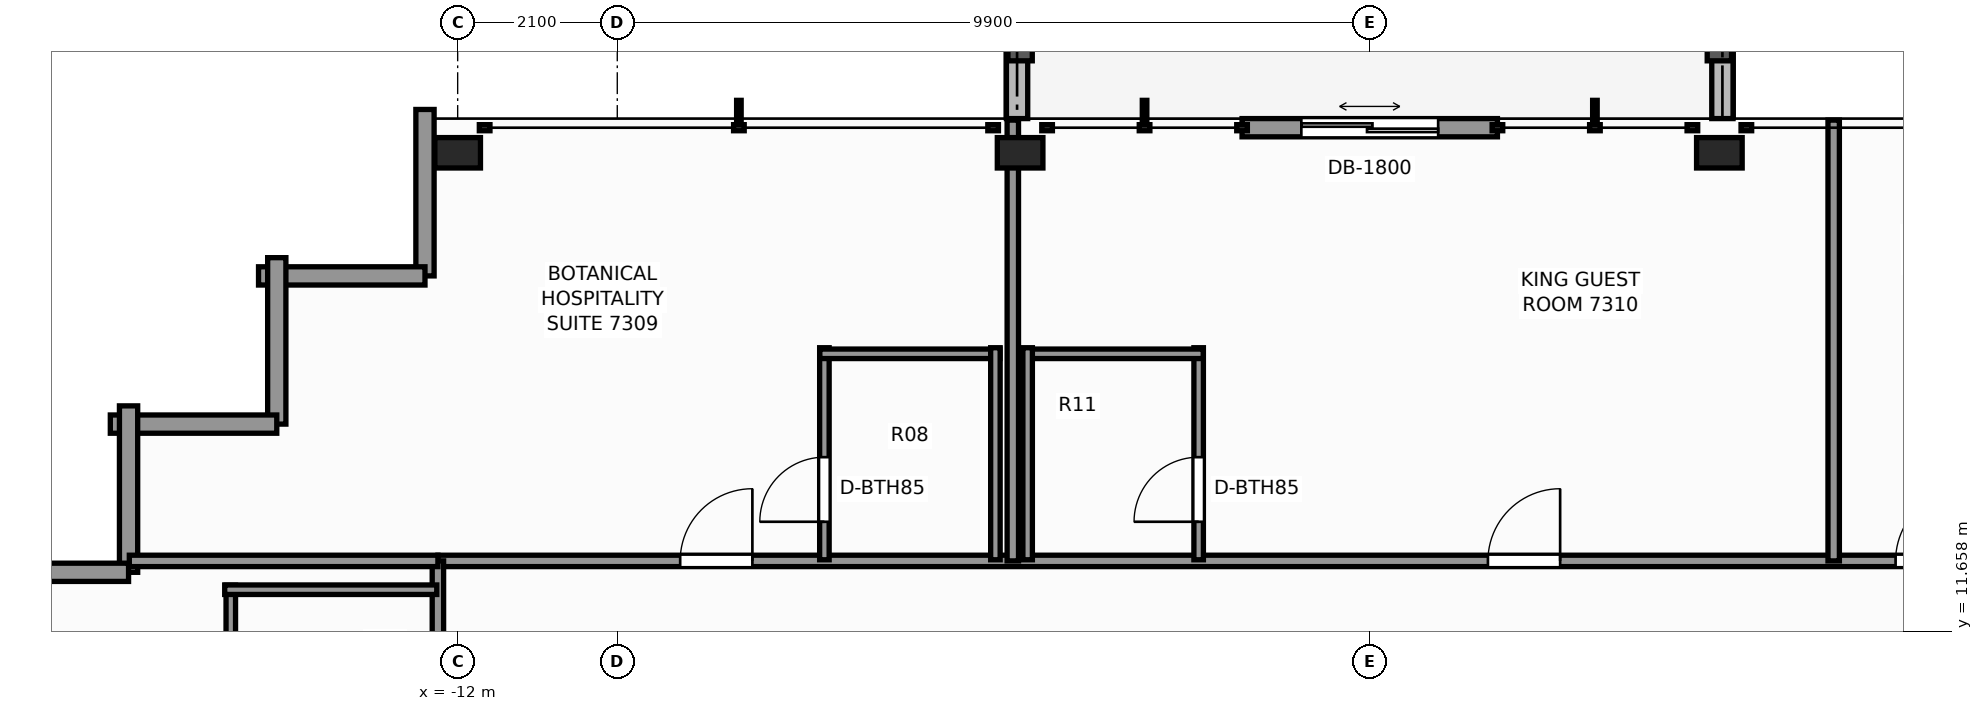
"""IFC4 building model, lengths in metres.
Left out: names, types, materials, properties, quantities, classifications, styles, units other than length and angle.
Written with IfcOpenShell. Run it as: python <this file> out.ifc"""

import sys

from ifc_helpers import new_model, si_unit, direction, frame, frame_2d, origin, origin_2d, place, context, subcontext, project, spatial, rectangle, extrude, element, fill, save


model = new_model("IFC4")
c1 = context("Model", 3, precision=1e-05, world=origin(), true_north=direction((0.0, 1.0)))
c2 = subcontext(c1, "Body", "Model", "MODEL_VIEW")
j1 = project(units=[si_unit("LENGTHUNIT", "METRE"), si_unit("PLANEANGLEUNIT", "RADIAN")], contexts=[c1])
p1 = place(None, origin())
s1 = spatial("IfcSite", under=j1, at=p1, CompositionType="ELEMENT")
p2 = place(p1, origin())
s2 = spatial("IfcBuilding", under=s1, at=p2, CompositionType="ELEMENT")
p3 = place(p2, frame((0.0, 0.0, 251.4)))
s3 = spatial("IfcBuildingStorey", under=s2, at=p3, CompositionType="ELEMENT", Elevation=251.4)
for number, where, z_axis, x_axis in (
    (1, (-12.0, 17.95, 0.0), (0.0, 0.0, 1.0), (1.0, 0.0, 0.0)),
    (2, (-4.6, 17.95, 0.0), (0.0, 0.0, 1.0), (1.0, 0.0, 0.0)),
    (3, (4.6, 17.95, 0.0), (0.0, 0.0, 1.0), (1.0, 0.0, 0.0)),
):
    element("IfcColumn", number, at=place(p3, frame(where, z_axis=z_axis, x_axis=x_axis)), inside=s3, PredefinedType="COLUMN", context=c2, shape_type="SweptSolid", body=[
        extrude(rectangle(XDim=0.6, YDim=0.4, at=origin_2d()), origin(), (0.0, 0.0, 1.0), 3.5),
    ])
for number, where, z_axis, x_axis in (
    (4, (4.64, 18.4, -0.07), (0.0, 0.0, 1.0), (0.0, 1.0, 0.0)),
    (5, (-4.64, 21.7, -0.07), (0.0, 0.0, 1.0), (0.0, -1.0, 0.0)),
):
    element("IfcWall", number, at=place(p3, frame(where, z_axis=z_axis, x_axis=x_axis)), inside=s3, PredefinedType="PARAPET", context=c2, shape_type="SweptSolid", body=[
        extrude(rectangle(XDim=3.3, YDim=0.28, at=frame_2d((1.65, 0.0))), origin(), (0.0, 0.0, 1.0), 0.42),
    ])
p4 = place(p3, frame((-1.68, 18.28, 0.0), z_axis=(0.0, 0.0, 1.0), x_axis=(1.0, 0.0, 0.0)))
e6 = element("IfcWall", 6, at=p4, inside=s3, PredefinedType="STANDARD", context=c2, shape_type="SweptSolid", body=[
    extrude(rectangle(XDim=3.36, YDim=0.24, at=frame_2d((1.68, 0.0))), origin(), (0.0, 0.0, 1.0), 3.25),
])
p5 = place(p4, frame((0.78, 0.0, 0.0)))
e7 = element("IfcOpeningElement", 7, at=p5, cuts=e6, PredefinedType="OPENING", context=c2, shape_type="SweptSolid", body=[
    extrude(rectangle(XDim=1.8, YDim=2.2, at=frame_2d((0.9, 1.1))), frame((0.0, 0.13, 0.0), z_axis=(0.0, -1.0, 0.0), x_axis=(1.0, 0.0, 0.0)), (0.0, 0.0, 1.0), 0.26),
])
p6 = place(p3, frame((-12.43, 16.33, 0.0), z_axis=(0.0, 0.0, 1.0), x_axis=(0.0, 1.0, 0.0)))
e8 = element("IfcWall", 8, at=p6, inside=s3, PredefinedType="STANDARD", context=c2, shape_type="SweptSolid", body=[
    extrude(rectangle(XDim=2.19, YDim=0.24, at=frame_2d((1.095, 0.0))), origin(), (0.0, 0.0, 1.0), 2.633),
])
for number, where, z_axis, x_axis in (
    (9, (-14.62, 16.33, 0.0), (0.0, 0.0, 1.0), (1.0, 0.0, 0.0)),
    (10, (-14.38, 14.38, 0.0), (0.0, 0.0, 1.0), (0.0, 1.0, 0.0)),
    (11, (-16.57, 14.38, 0.0), (0.0, 0.0, 1.0), (1.0, 0.0, 0.0)),
    (12, (-16.33, 12.43, 0.0), (0.0, 0.0, 1.0), (0.0, 1.0, 0.0)),
):
    element("IfcWall", number, at=place(p3, frame(where, z_axis=z_axis, x_axis=x_axis)), inside=s3, PredefinedType="STANDARD", context=c2, shape_type="SweptSolid", body=[
        extrude(rectangle(XDim=2.19, YDim=0.24, at=frame_2d((1.095, 0.0))), origin(), (0.0, 0.0, 1.0), 2.633),
    ])
p7 = place(p3, frame((-18.52, 12.43, 0.0), z_axis=(0.0, 0.0, 1.0), x_axis=(1.0, 0.0, 0.0)))
e13 = element("IfcWall", 13, at=p7, inside=s3, PredefinedType="STANDARD", context=c2, shape_type="SweptSolid", body=[
    extrude(rectangle(XDim=2.19, YDim=0.24, at=frame_2d((1.095, 0.0))), origin(), (0.0, 0.0, 1.0), 2.633),
])
p8 = place(p3, frame((-12.26, 12.58, 0.0), z_axis=(0.0, 0.0, 1.0), x_axis=(1.0, 0.0, 0.0)))
e14 = element("IfcWall", 14, at=p8, inside=s3, PredefinedType="PARTITIONING", context=c2, shape_type="SweptSolid", body=[
    extrude(rectangle(XDim=24.68, YDim=0.15, at=frame_2d((12.34, 0.0))), origin(), (0.0, 0.0, 1.0), 2.539),
])
p9 = place(p8, frame((3.188, 0.0, 0.0)))
e15 = element("IfcOpeningElement", 15, at=p9, cuts=e14, PredefinedType="OPENING", context=c2, shape_type="SweptSolid", body=[
    extrude(rectangle(XDim=0.95, YDim=2.06, at=frame_2d((0.475, 1.03))), frame((0.0, 0.085, 0.0), z_axis=(0.0, -1.0, 0.0), x_axis=(1.0, 0.0, 0.0)), (0.0, 0.0, 1.0), 0.17),
])
p10 = place(p8, frame((13.815, 0.0, 0.0)))
e16 = element("IfcOpeningElement", 16, at=p10, cuts=e14, PredefinedType="OPENING", context=c2, shape_type="SweptSolid", body=[
    extrude(rectangle(XDim=0.95, YDim=2.06, at=frame_2d((0.475, 1.03))), frame((0.0, 0.085, 0.0), z_axis=(0.0, -1.0, 0.0), x_axis=(1.0, 0.0, 0.0)), (0.0, 0.0, 1.0), 0.17),
])
p11 = place(p8, frame((19.178, 0.0, 0.0)))
e17 = element("IfcOpeningElement", 17, at=p11, cuts=e14, PredefinedType="OPENING", context=c2, shape_type="SweptSolid", body=[
    extrude(rectangle(XDim=0.95, YDim=2.06, at=frame_2d((0.475, 1.03))), frame((0.0, 0.085, 0.0), z_axis=(0.0, -1.0, 0.0), x_axis=(1.0, 0.0, 0.0)), (0.0, 0.0, 1.0), 0.17),
])
p12 = place(p3, frame((-12.26, -12.26, 0.0), z_axis=(0.0, 0.0, 1.0), x_axis=(0.0, 1.0, 0.0)))
e18 = element("IfcWall", 18, at=p12, inside=s3, PredefinedType="PARTITIONING", context=c2, shape_type="SweptSolid", body=[
    extrude(rectangle(XDim=24.84, YDim=0.15, at=frame_2d((12.42, 0.0))), origin(), (0.0, 0.0, 1.0), 2.539),
])
p13 = place(p12, frame((3.631, 0.0, 0.0)))
e19 = element("IfcOpeningElement", 19, at=p13, cuts=e18, PredefinedType="OPENING", context=c2, shape_type="SweptSolid", body=[
    extrude(rectangle(XDim=0.95, YDim=2.06, at=frame_2d((0.475, 1.03))), frame((0.0, 0.085, 0.0), z_axis=(0.0, -1.0, 0.0), x_axis=(1.0, 0.0, 0.0)), (0.0, 0.0, 1.0), 0.17),
])
p14 = place(p12, frame((8.701, 0.0, 0.0)))
e20 = element("IfcOpeningElement", 20, at=p14, cuts=e18, PredefinedType="OPENING", context=c2, shape_type="SweptSolid", body=[
    extrude(rectangle(XDim=0.95, YDim=2.06, at=frame_2d((0.475, 1.03))), frame((0.0, 0.085, 0.0), z_axis=(0.0, -1.0, 0.0), x_axis=(1.0, 0.0, 0.0)), (0.0, 0.0, 1.0), 0.17),
])
p15 = place(p12, frame((14.031, 0.0, 0.0)))
e21 = element("IfcOpeningElement", 21, at=p15, cuts=e18, PredefinedType="OPENING", context=c2, shape_type="SweptSolid", body=[
    extrude(rectangle(XDim=0.95, YDim=2.06, at=frame_2d((0.475, 1.03))), frame((0.0, 0.085, 0.0), z_axis=(0.0, -1.0, 0.0), x_axis=(1.0, 0.0, 0.0)), (0.0, 0.0, 1.0), 0.17),
])
p16 = place(p12, frame((19.741, 0.0, 0.0)))
e22 = element("IfcOpeningElement", 22, at=p16, cuts=e18, PredefinedType="OPENING", context=c2, shape_type="SweptSolid", body=[
    extrude(rectangle(XDim=0.95, YDim=2.06, at=frame_2d((0.475, 1.03))), frame((0.0, 0.085, 0.0), z_axis=(0.0, -1.0, 0.0), x_axis=(1.0, 0.0, 0.0)), (0.0, 0.0, 1.0), 0.17),
])
p17 = place(p3, frame((-16.32, 12.58, 0.0), z_axis=(0.0, 0.0, 1.0), x_axis=(1.0, 0.0, 0.0)))
e23 = element("IfcWall", 23, at=p17, inside=s3, PredefinedType="PARTITIONING", context=c2, shape_type="SweptSolid", body=[
    extrude(rectangle(XDim=4.06, YDim=0.15, at=frame_2d((2.03, 0.0))), origin(), (0.0, 0.0, 1.0), 3.25),
])
p18 = place(p3, frame((-14.985, 9.891, 0.0), z_axis=(0.0, 0.0, 1.0), x_axis=(0.0, 1.0, 0.0)))
e24 = element("IfcWall", 24, at=p18, inside=s3, PredefinedType="PARTITIONING", context=c2, shape_type="SweptSolid", body=[
    extrude(rectangle(XDim=2.37, YDim=0.125, at=frame_2d((1.185, 0.0))), origin(), (0.0, 0.0, 1.0), 2.539),
])
p19 = place(p3, frame((-15.065, 12.201, 0.0), z_axis=(0.0, 0.0, 1.0), x_axis=(1.0, 0.0, 0.0)))
e25 = element("IfcWall", 25, at=p19, inside=s3, PredefinedType="PARTITIONING", context=c2, shape_type="SweptSolid", body=[
    extrude(rectangle(XDim=2.79, YDim=0.125, at=frame_2d((1.395, 0.0))), origin(), (0.0, 0.0, 1.0), 3.25),
])
p20 = place(p3, frame((-4.696, 12.58, 0.0), z_axis=(0.0, 0.0, 1.0), x_axis=(0.0, 1.0, 0.0)))
e26 = element("IfcWall", 26, at=p20, inside=s3, PredefinedType="PARTITIONING", context=c2, shape_type="SweptSolid", body=[
    extrude(rectangle(XDim=5.8, YDim=0.15, at=frame_2d((2.9, 0.0))), origin(), (0.0, 0.0, 1.0), 2.539),
])
p21 = place(p3, frame((-7.175, 12.595, 0.0), z_axis=(0.0, 0.0, 1.0), x_axis=(0.0, 1.0, 0.0)))
e27 = element("IfcWall", 27, at=p21, inside=s3, PredefinedType="PARTITIONING", context=c2, shape_type="SweptSolid", body=[
    extrude(rectangle(XDim=2.79, YDim=0.125, at=frame_2d((1.395, 0.0))), origin(), (0.0, 0.0, 1.0), 3.25),
])
p22 = place(p21, frame((0.5, 0.0, 0.0)))
e28 = element("IfcOpeningElement", 28, at=p22, cuts=e27, PredefinedType="OPENING", context=c2, shape_type="SweptSolid", body=[
    extrude(rectangle(XDim=0.85, YDim=2.03, at=frame_2d((0.425, 1.015))), frame((0.0, 0.073, 0.0), z_axis=(0.0, -1.0, 0.0), x_axis=(1.0, 0.0, 0.0)), (0.0, 0.0, 1.0), 0.145),
])
p23 = place(p3, frame((-7.235, 15.305, 0.0), z_axis=(0.0, 0.0, 1.0), x_axis=(1.0, 0.0, 0.0)))
e29 = element("IfcWall", 29, at=p23, inside=s3, PredefinedType="PARTITIONING", context=c2, shape_type="SweptSolid", body=[
    extrude(rectangle(XDim=2.37, YDim=0.125, at=frame_2d((1.185, 0.0))), origin(), (0.0, 0.0, 1.0), 3.25),
])
p24 = place(p3, frame((-4.925, 12.595, 0.0), z_axis=(0.0, 0.0, 1.0), x_axis=(0.0, 1.0, 0.0)))
e30 = element("IfcWall", 30, at=p24, inside=s3, PredefinedType="PARTITIONING", context=c2, shape_type="SweptSolid", body=[
    extrude(rectangle(XDim=2.79, YDim=0.125, at=frame_2d((1.395, 0.0))), origin(), (0.0, 0.0, 1.0), 3.25),
])
p25 = place(p3, frame((6.104, 12.58, 0.0), z_axis=(0.0, 0.0, 1.0), x_axis=(0.0, 1.0, 0.0)))
e31 = element("IfcWall", 31, at=p25, inside=s3, PredefinedType="PARTITIONING", context=c2, shape_type="SweptSolid", body=[
    extrude(rectangle(XDim=5.8, YDim=0.15, at=frame_2d((2.9, 0.0))), origin(), (0.0, 0.0, 1.0), 2.623),
])
p26 = place(p3, frame((-2.251, 12.595, 0.0), z_axis=(0.0, 0.0, 1.0), x_axis=(0.0, 1.0, 0.0)))
e32 = element("IfcWall", 32, at=p26, inside=s3, PredefinedType="PARTITIONING", context=c2, shape_type="SweptSolid", body=[
    extrude(rectangle(XDim=2.79, YDim=0.125, at=frame_2d((1.395, 0.0))), origin(), (0.0, 0.0, 1.0), 3.25),
])
p27 = place(p26, frame((0.5, 0.0, 0.0)))
e33 = element("IfcOpeningElement", 33, at=p27, cuts=e32, PredefinedType="OPENING", context=c2, shape_type="SweptSolid", body=[
    extrude(rectangle(XDim=0.85, YDim=2.03, at=frame_2d((0.425, 1.015))), frame((0.0, 0.073, 0.0), z_axis=(0.0, -1.0, 0.0), x_axis=(1.0, 0.0, 0.0)), (0.0, 0.0, 1.0), 0.145),
])
p28 = place(p3, frame((-4.561, 15.305, 0.0), z_axis=(0.0, 0.0, 1.0), x_axis=(1.0, 0.0, 0.0)))
e34 = element("IfcWall", 34, at=p28, inside=s3, PredefinedType="PARTITIONING", context=c2, shape_type="SweptSolid", body=[
    extrude(rectangle(XDim=2.37, YDim=0.125, at=frame_2d((1.185, 0.0))), origin(), (0.0, 0.0, 1.0), 2.539),
])
p29 = place(p3, frame((-4.501, 12.595, 0.0), z_axis=(0.0, 0.0, 1.0), x_axis=(0.0, 1.0, 0.0)))
e35 = element("IfcWall", 35, at=p29, inside=s3, PredefinedType="PARTITIONING", context=c2, shape_type="SweptSolid", body=[
    extrude(rectangle(XDim=2.79, YDim=0.125, at=frame_2d((1.395, 0.0))), origin(), (0.0, 0.0, 1.0), 2.539),
])
p30 = place(p5, origin())
e36 = element("IfcDoor", 36, at=p30, inside=s3, OperationType="DOUBLE_DOOR_SLIDING", PredefinedType="DOOR", context=c2, shape_type="SweptSolid", body=[
    extrude(rectangle(XDim=1.8, YDim=2.2, at=frame_2d((0.9, 1.1))), frame((0.0, 0.025, 0.0), z_axis=(0.0, -1.0, 0.0), x_axis=(1.0, 0.0, 0.0)), (0.0, 0.0, 1.0), 0.05),
])
fill(e7, e36)
p31 = place(p22, origin())
e37 = element("IfcDoor", 37, at=p31, inside=s3, OperationType="SINGLE_SWING_LEFT", PredefinedType="DOOR", context=c2, shape_type="SweptSolid", body=[
    extrude(rectangle(XDim=0.85, YDim=2.03, at=frame_2d((0.425, 1.015))), frame((0.0, 0.025, 0.0), z_axis=(0.0, -1.0, 0.0), x_axis=(1.0, 0.0, 0.0)), (0.0, 0.0, 1.0), 0.05),
])
fill(e28, e37)
p32 = place(p9, origin())
e38 = element("IfcDoor", 38, at=p32, inside=s3, OperationType="SINGLE_SWING_RIGHT", PredefinedType="DOOR", context=c2, shape_type="SweptSolid", body=[
    extrude(rectangle(XDim=0.95, YDim=2.06, at=frame_2d((0.475, 1.03))), frame((0.0, 0.025, 0.0), z_axis=(0.0, -1.0, 0.0), x_axis=(1.0, 0.0, 0.0)), (0.0, 0.0, 1.0), 0.05),
])
fill(e15, e38)
p33 = place(p27, origin())
e39 = element("IfcDoor", 39, at=p33, inside=s3, OperationType="SINGLE_SWING_LEFT", PredefinedType="DOOR", context=c2, shape_type="SweptSolid", body=[
    extrude(rectangle(XDim=0.85, YDim=2.03, at=frame_2d((0.425, 1.015))), frame((0.0, 0.025, 0.0), z_axis=(0.0, -1.0, 0.0), x_axis=(1.0, 0.0, 0.0)), (0.0, 0.0, 1.0), 0.05),
])
fill(e33, e39)
p34 = place(p10, origin())
e40 = element("IfcDoor", 40, at=p34, inside=s3, OperationType="SINGLE_SWING_RIGHT", PredefinedType="DOOR", context=c2, shape_type="SweptSolid", body=[
    extrude(rectangle(XDim=0.95, YDim=2.06, at=frame_2d((0.475, 1.03))), frame((0.0, 0.025, 0.0), z_axis=(0.0, -1.0, 0.0), x_axis=(1.0, 0.0, 0.0)), (0.0, 0.0, 1.0), 0.05),
])
fill(e16, e40)
p35 = place(p11, origin())
e41 = element("IfcDoor", 41, at=p35, inside=s3, OperationType="SINGLE_SWING_RIGHT", PredefinedType="DOOR", context=c2, shape_type="SweptSolid", body=[
    extrude(rectangle(XDim=0.95, YDim=2.06, at=frame_2d((0.475, 1.03))), frame((0.0, 0.025, 0.0), z_axis=(0.0, -1.0, 0.0), x_axis=(1.0, 0.0, 0.0)), (0.0, 0.0, 1.0), 0.05),
])
fill(e17, e41)
save(model, sys.argv[1])
